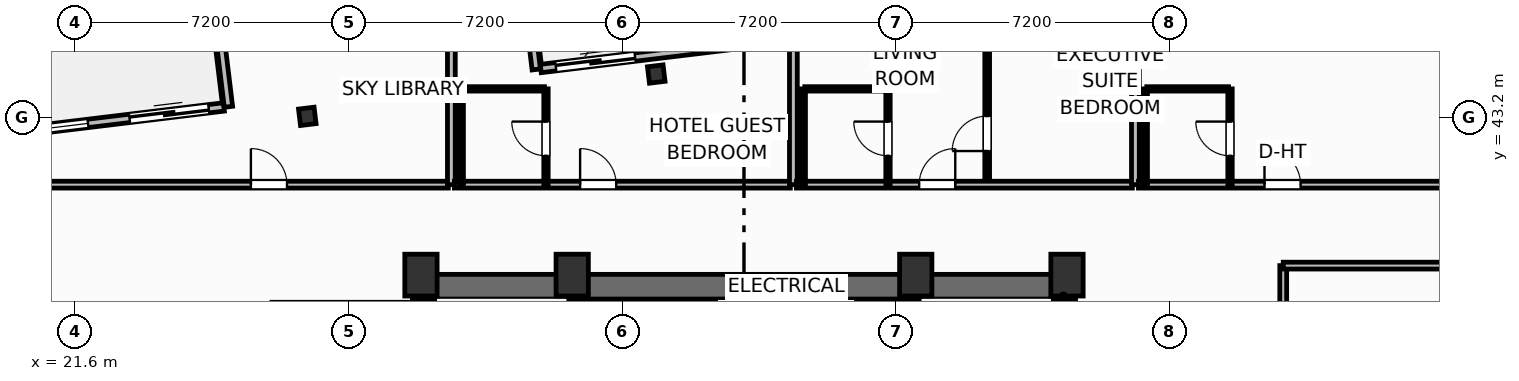
"""IFC4 building model, lengths in metres.
Left out: names, types, materials, properties, quantities, classifications, styles, units other than length and angle.
Written with IfcOpenShell. Run it as: python <this file> out.ifc"""

import sys

from ifc_helpers import new_model, si_unit, direction, frame, frame_2d, origin, origin_2d, place, context, subcontext, project, spatial, rectangle, i_section, extrude, element, fill, save


model = new_model("IFC4")
c1 = context("Model", 3, precision=1e-05, world=origin(), true_north=direction((0.0, 1.0)))
c2 = subcontext(c1, "Body", "Model", "MODEL_VIEW")
j1 = project(units=[si_unit("LENGTHUNIT", "METRE"), si_unit("PLANEANGLEUNIT", "RADIAN")], contexts=[c1])
p1 = place(None, origin())
s1 = spatial("IfcSite", under=j1, at=p1, CompositionType="ELEMENT")
p2 = place(p1, origin())
s2 = spatial("IfcBuilding", under=s1, at=p2, CompositionType="ELEMENT")
p3 = place(p2, frame((0.0, 0.0, 182.0)))
s3 = spatial("IfcBuildingStorey", under=s2, at=p3, CompositionType="ELEMENT", Elevation=182.0)
for number, where, z_axis, x_axis in (
    (1, (30.7, 39.05, 0.0), (0.0, 0.0, 1.0), (1.0, 0.0, 0.0)),
    (2, (34.68, 39.05, 0.0), (0.0, 0.0, 1.0), (1.0, 0.0, 0.0)),
    (3, (43.72, 39.05, 0.0), (0.0, 0.0, 1.0), (1.0, 0.0, 0.0)),
    (4, (47.7, 39.05, 0.0), (0.0, 0.0, 1.0), (1.0, 0.0, 0.0)),
):
    element("IfcColumn", number, at=place(p3, frame(where, z_axis=z_axis, x_axis=x_axis)), inside=s3, PredefinedType="COLUMN", context=c2, shape_type="SweptSolid", body=[
        extrude(rectangle(XDim=0.85, YDim=1.1, at=origin_2d()), origin(), (0.0, 0.0, 1.0), 3.7),
    ])
p4 = place(p3, frame((30.48, 38.745, 0.0), z_axis=(0.0, 0.0, 1.0), x_axis=(1.0, 0.0, 0.0)))
e5 = element("IfcWall", 5, at=p4, inside=s3, PredefinedType="SHEAR", context=c2, shape_type="SweptSolid", body=[
    extrude(rectangle(XDim=17.44, YDim=0.65, at=frame_2d((8.72, 0.0))), origin(), (0.0, 0.0, 1.0), 3.45),
])
for number, where, z_axis, x_axis in (
    (6, (30.805, 29.2, 0.0), (0.0, 0.0, 1.0), (0.0, 1.0, 0.0)),
    (7, (47.595, 29.2, 0.0), (0.0, 0.0, 1.0), (0.0, 1.0, 0.0)),
):
    element("IfcWall", number, at=place(p3, frame(where, z_axis=z_axis, x_axis=x_axis)), inside=s3, PredefinedType="SHEAR", context=c2, shape_type="SweptSolid", body=[
        extrude(rectangle(XDim=9.22, YDim=0.65, at=frame_2d((4.61, 0.0))), origin(), (0.0, 0.0, 1.0), 3.45),
    ])
p5 = place(p3, frame((34.64, 29.2, 0.0), z_axis=(0.0, 0.0, 1.0), x_axis=(0.0, 1.0, 0.0)))
e8 = element("IfcWall", 8, at=p5, inside=s3, PredefinedType="SHEAR", context=c2, shape_type="SweptSolid", body=[
    extrude(rectangle(XDim=9.22, YDim=0.25, at=frame_2d((4.61, 0.0))), origin(), (0.0, 0.0, 1.0), 3.45),
])
p6 = place(p5, frame((0.65, 0.0, 0.0)))
e9 = element("IfcOpeningElement", 9, at=p6, cuts=e8, PredefinedType="OPENING", context=c2, shape_type="SweptSolid", body=[
    extrude(rectangle(XDim=1.05, YDim=2.15, at=frame_2d((0.525, 1.075))), frame((0.0, 0.135, 0.0), z_axis=(0.0, -1.0, 0.0), x_axis=(1.0, 0.0, 0.0)), (0.0, 0.0, 1.0), 0.27),
])
p7 = place(p3, frame((43.76, 29.2, 0.0), z_axis=(0.0, 0.0, 1.0), x_axis=(0.0, 1.0, 0.0)))
e10 = element("IfcWall", 10, at=p7, inside=s3, PredefinedType="SHEAR", context=c2, shape_type="SweptSolid", body=[
    extrude(rectangle(XDim=9.22, YDim=0.25, at=frame_2d((4.61, 0.0))), origin(), (0.0, 0.0, 1.0), 3.45),
])
p8 = place(p7, frame((0.65, 0.0, 0.0)))
e11 = element("IfcOpeningElement", 11, at=p8, cuts=e10, PredefinedType="OPENING", context=c2, shape_type="SweptSolid", body=[
    extrude(rectangle(XDim=1.05, YDim=2.15, at=frame_2d((0.525, 1.075))), frame((0.0, 0.135, 0.0), z_axis=(0.0, -1.0, 0.0), x_axis=(1.0, 0.0, 0.0)), (0.0, 0.0, 1.0), 0.27),
])
for number, where, z_axis, x_axis in (
    (12, (36.892, 44.341, 0.0), (0.0, 0.0, 1.0), (0.993, 0.12, 0.0)),
    (13, (27.709, 43.227, 0.0), (0.0, 0.0, 1.0), (0.993, 0.12, 0.0)),
):
    element("IfcColumn", number, at=place(p3, frame(where, z_axis=z_axis, x_axis=x_axis)), inside=s3, PredefinedType="COLUMN", context=c2, shape_type="SweptSolid", body=[
        extrude(i_section(OverallWidth=0.412, OverallDepth=0.435, WebThickness=0.036, FlangeThickness=0.057, FilletRadius=0.025, at=origin_2d()), origin(), (0.0, 0.0, 1.0), 3.7),
    ])
p9 = place(p3, frame((19.557, 42.753, 0.0), z_axis=(0.0, 0.0, 1.0), x_axis=(0.992729951822, 0.120362962556, 0.0)))
e14 = element("IfcWall", 14, at=p9, inside=s3, PredefinedType="SOLIDWALL", context=c2, shape_type="SweptSolid", body=[
    extrude(rectangle(XDim=6.0, YDim=0.22, at=frame_2d((3.0, 0.0))), origin(), (0.0, 0.0, 1.0), 2.73),
])
p10 = place(p9, frame((3.5, 0.0, 0.0)))
e15 = element("IfcOpeningElement", 15, at=p10, cuts=e14, PredefinedType="OPENING", context=c2, shape_type="SweptSolid", body=[
    extrude(rectangle(XDim=2.1, YDim=2.3, at=frame_2d((1.05, 1.15))), frame((0.0, 0.12, 0.0), z_axis=(0.0, -1.0, 0.0), x_axis=(1.0, 0.0, 0.0)), (0.0, 0.0, 1.0), 0.24),
])
p11 = place(p9, frame((0.55, 0.0, 0.75)))
e16 = element("IfcOpeningElement", 16, at=p11, cuts=e14, PredefinedType="OPENING", context=c2, shape_type="SweptSolid", body=[
    extrude(rectangle(XDim=1.85, YDim=1.75, at=frame_2d((0.925, 0.875))), frame((0.0, 0.12, 0.0), z_axis=(0.0, -1.0, 0.0), x_axis=(1.0, 0.0, 0.0)), (0.0, 0.0, 1.0), 0.24),
])
p12 = place(p3, frame((33.852, 44.486, 0.0), z_axis=(0.0, 0.0, 1.0), x_axis=(0.992729951822, 0.120362962556, 0.0)))
e17 = element("IfcWall", 17, at=p12, inside=s3, PredefinedType="SOLIDWALL", context=c2, shape_type="SweptSolid", body=[
    extrude(rectangle(XDim=6.0, YDim=0.22, at=frame_2d((3.0, 0.0))), origin(), (0.0, 0.0, 1.0), 2.73),
])
p13 = place(p12, frame((0.4, 0.0, 0.0)))
e18 = element("IfcOpeningElement", 18, at=p13, cuts=e17, PredefinedType="OPENING", context=c2, shape_type="SweptSolid", body=[
    extrude(rectangle(XDim=2.1, YDim=2.3, at=frame_2d((1.05, 1.15))), frame((0.0, 0.12, 0.0), z_axis=(0.0, -1.0, 0.0), x_axis=(1.0, 0.0, 0.0)), (0.0, 0.0, 1.0), 0.24),
])
p14 = place(p3, frame((33.734, 44.461, 0.0), z_axis=(0.0, 0.0, 1.0), x_axis=(-0.120327895535, 0.992734202874, 0.0)))
e19 = element("IfcWall", 19, at=p14, inside=s3, PredefinedType="SOLIDWALL", context=c2, shape_type="SweptSolid", body=[
    extrude(rectangle(XDim=2.1, YDim=0.22, at=frame_2d((1.05, 0.0))), origin(), (0.0, 0.0, 1.0), 2.73),
])
p15 = place(p3, frame((25.396, 45.44, 0.0), z_axis=(0.0, 0.0, 1.0), x_axis=(0.120275992932, -0.992740492538, 0.0)))
e20 = element("IfcWall", 20, at=p15, inside=s3, PredefinedType="SOLIDWALL", context=c2, shape_type="SweptSolid", body=[
    extrude(rectangle(XDim=1.975, YDim=0.22, at=frame_2d((0.988, 0.0))), origin(), (0.0, 0.0, 1.0), 2.73),
])
p16 = place(p3, frame((3.393, 41.43, 0.0), z_axis=(0.0, 0.0, 1.0), x_axis=(1.0, 0.0, 0.0)))
e21 = element("IfcWall", 21, at=p16, inside=s3, PredefinedType="PARTITIONING", context=c2, shape_type="SweptSolid", body=[
    extrude(rectangle(XDim=28.027, YDim=0.18, at=frame_2d((14.013, 0.0))), origin(), (0.0, 0.0, 1.0), 2.662),
])
p17 = place(p16, frame((22.832, 0.0, 0.0)))
e22 = element("IfcOpeningElement", 22, at=p17, cuts=e21, PredefinedType="OPENING", context=c2, shape_type="SweptSolid", body=[
    extrude(rectangle(XDim=0.95, YDim=2.05, at=frame_2d((0.475, 1.025))), frame((0.0, 0.1, 0.0), z_axis=(0.0, -1.0, 0.0), x_axis=(1.0, 0.0, 0.0)), (0.0, 0.0, 1.0), 0.2),
])
p18 = place(p3, frame((31.5, 41.43, 0.0), z_axis=(0.0, 0.0, 1.0), x_axis=(0.0, 1.0, 0.0)))
e23 = element("IfcWall", 23, at=p18, inside=s3, PredefinedType="PARTITIONING", context=c2, shape_type="SweptSolid", body=[
    extrude(rectangle(XDim=4.856, YDim=0.205, at=frame_2d((2.428, 0.0))), origin(), (0.0, 0.0, 1.0), 3.45),
])
p19 = place(p3, frame((31.58, 41.43, 0.0), z_axis=(0.0, 0.0, 1.0), x_axis=(1.0, 0.0, 0.0)))
e24 = element("IfcWall", 24, at=p19, inside=s3, PredefinedType="PARTITIONING", context=c2, shape_type="SweptSolid", body=[
    extrude(rectangle(XDim=8.84, YDim=0.18, at=frame_2d((4.42, 0.0))), origin(), (0.0, 0.0, 1.0), 3.45),
])
p20 = place(p19, frame((3.308, 0.0, 0.0)))
e25 = element("IfcOpeningElement", 25, at=p20, cuts=e24, PredefinedType="OPENING", context=c2, shape_type="SweptSolid", body=[
    extrude(rectangle(XDim=0.95, YDim=2.15, at=frame_2d((0.475, 1.075))), frame((0.0, 0.1, 0.0), z_axis=(0.0, -1.0, 0.0), x_axis=(1.0, 0.0, 0.0)), (0.0, 0.0, 1.0), 0.2),
])
p21 = place(p3, frame((31.8, 43.95, 0.0), z_axis=(0.0, 0.0, 1.0), x_axis=(1.0, 0.0, 0.0)))
e26 = element("IfcWall", 26, at=p21, inside=s3, PredefinedType="PARTITIONING", context=c2, shape_type="SweptSolid", body=[
    extrude(rectangle(XDim=2.15, YDim=0.115, at=frame_2d((1.075, 0.0))), origin(), (0.0, 0.0, 1.0), 2.824),
])
p22 = place(p3, frame((33.99, 41.43, 0.0), z_axis=(0.0, 0.0, 1.0), x_axis=(0.0, 1.0, 0.0)))
e27 = element("IfcWall", 27, at=p22, inside=s3, PredefinedType="PARTITIONING", context=c2, shape_type="SweptSolid", body=[
    extrude(rectangle(XDim=2.52, YDim=0.115, at=frame_2d((1.26, 0.0))), origin(), (0.0, 0.0, 1.0), 3.45),
])
p23 = place(p22, frame((0.76, 0.0, 0.0)))
e28 = element("IfcOpeningElement", 28, at=p23, cuts=e27, PredefinedType="OPENING", context=c2, shape_type="SweptSolid", body=[
    extrude(rectangle(XDim=0.9, YDim=2.05, at=frame_2d((0.45, 1.025))), frame((0.0, 0.067, 0.0), z_axis=(0.0, -1.0, 0.0), x_axis=(1.0, 0.0, 0.0)), (0.0, 0.0, 1.0), 0.135),
])
p24 = place(p3, frame((31.76, 41.43, 0.0), z_axis=(0.0, 0.0, 1.0), x_axis=(0.0, 1.0, 0.0)))
e29 = element("IfcWall", 29, at=p24, inside=s3, PredefinedType="PARTITIONING", context=c2, shape_type="SweptSolid", body=[
    extrude(rectangle(XDim=2.52, YDim=0.115, at=frame_2d((1.26, 0.0))), origin(), (0.0, 0.0, 1.0), 3.45),
])
p25 = place(p3, frame((40.5, 41.43, 0.0), z_axis=(0.0, 0.0, 1.0), x_axis=(0.0, 1.0, 0.0)))
e30 = element("IfcWall", 30, at=p25, inside=s3, PredefinedType="PARTITIONING", context=c2, shape_type="SweptSolid", body=[
    extrude(rectangle(XDim=5.947, YDim=0.205, at=frame_2d((2.974, 0.0))), origin(), (0.0, 0.0, 1.0), 3.45),
])
p26 = place(p3, frame((45.6, 41.43, 0.0), z_axis=(0.0, 0.0, 1.0), x_axis=(0.0, 1.0, 0.0)))
e31 = element("IfcWall", 31, at=p26, inside=s3, PredefinedType="PARTITIONING", context=c2, shape_type="SweptSolid", body=[
    extrude(rectangle(XDim=6.565, YDim=0.125, at=frame_2d((3.283, 0.0))), origin(), (0.0, 0.0, 1.0), 3.45),
])
p27 = place(p26, frame((0.885, 0.0, 0.0)))
e32 = element("IfcOpeningElement", 32, at=p27, cuts=e31, PredefinedType="OPENING", context=c2, shape_type="SweptSolid", body=[
    extrude(rectangle(XDim=0.92, YDim=2.05, at=frame_2d((0.46, 1.025))), frame((0.0, 0.073, 0.0), z_axis=(0.0, -1.0, 0.0), x_axis=(1.0, 0.0, 0.0)), (0.0, 0.0, 1.0), 0.145),
])
p28 = place(p3, frame((40.58, 41.43, 0.0), z_axis=(0.0, 0.0, 1.0), x_axis=(1.0, 0.0, 0.0)))
e33 = element("IfcWall", 33, at=p28, inside=s3, PredefinedType="PARTITIONING", context=c2, shape_type="SweptSolid", body=[
    extrude(rectangle(XDim=8.84, YDim=0.18, at=frame_2d((4.42, 0.0))), origin(), (0.0, 0.0, 1.0), 3.45),
])
p29 = place(p28, frame((3.23, 0.0, 0.0)))
e34 = element("IfcOpeningElement", 34, at=p29, cuts=e33, PredefinedType="OPENING", context=c2, shape_type="SweptSolid", body=[
    extrude(rectangle(XDim=0.95, YDim=2.15, at=frame_2d((0.475, 1.075))), frame((0.0, 0.1, 0.0), z_axis=(0.0, -1.0, 0.0), x_axis=(1.0, 0.0, 0.0)), (0.0, 0.0, 1.0), 0.2),
])
p30 = place(p3, frame((40.8, 43.95, 0.0), z_axis=(0.0, 0.0, 1.0), x_axis=(1.0, 0.0, 0.0)))
e35 = element("IfcWall", 35, at=p30, inside=s3, PredefinedType="PARTITIONING", context=c2, shape_type="SweptSolid", body=[
    extrude(rectangle(XDim=2.15, YDim=0.115, at=frame_2d((1.075, 0.0))), origin(), (0.0, 0.0, 1.0), 3.45),
])
p31 = place(p3, frame((42.99, 41.43, 0.0), z_axis=(0.0, 0.0, 1.0), x_axis=(0.0, 1.0, 0.0)))
e36 = element("IfcWall", 36, at=p31, inside=s3, PredefinedType="PARTITIONING", context=c2, shape_type="SweptSolid", body=[
    extrude(rectangle(XDim=2.52, YDim=0.115, at=frame_2d((1.26, 0.0))), origin(), (0.0, 0.0, 1.0), 3.45),
])
p32 = place(p31, frame((0.76, 0.0, 0.0)))
e37 = element("IfcOpeningElement", 37, at=p32, cuts=e36, PredefinedType="OPENING", context=c2, shape_type="SweptSolid", body=[
    extrude(rectangle(XDim=0.9, YDim=2.05, at=frame_2d((0.45, 1.025))), frame((0.0, 0.067, 0.0), z_axis=(0.0, -1.0, 0.0), x_axis=(1.0, 0.0, 0.0)), (0.0, 0.0, 1.0), 0.135),
])
p33 = place(p3, frame((40.76, 41.43, 0.0), z_axis=(0.0, 0.0, 1.0), x_axis=(0.0, 1.0, 0.0)))
e38 = element("IfcWall", 38, at=p33, inside=s3, PredefinedType="PARTITIONING", context=c2, shape_type="SweptSolid", body=[
    extrude(rectangle(XDim=2.52, YDim=0.115, at=frame_2d((1.26, 0.0))), origin(), (0.0, 0.0, 1.0), 3.45),
])
p34 = place(p3, frame((49.5, 41.43, 0.0), z_axis=(0.0, 0.0, 1.0), x_axis=(0.0, 1.0, 0.0)))
e39 = element("IfcWall", 39, at=p34, inside=s3, PredefinedType="PARTITIONING", context=c2, shape_type="SweptSolid", body=[
    extrude(rectangle(XDim=4.923, YDim=0.205, at=frame_2d((2.461, 0.0))), origin(), (0.0, 0.0, 1.0), 3.45),
])
p35 = place(p3, frame((49.58, 41.43, 0.0), z_axis=(0.0, 0.0, 1.0), x_axis=(1.0, 0.0, 0.0)))
e40 = element("IfcWall", 40, at=p35, inside=s3, PredefinedType="PARTITIONING", context=c2, shape_type="SweptSolid", body=[
    extrude(rectangle(XDim=23.042, YDim=0.18, at=frame_2d((11.521, 0.0))), origin(), (0.0, 0.0, 1.0), 3.45),
])
p36 = place(p35, frame((3.317, 0.0, 0.0)))
e41 = element("IfcOpeningElement", 41, at=p36, cuts=e40, PredefinedType="OPENING", context=c2, shape_type="SweptSolid", body=[
    extrude(rectangle(XDim=0.95, YDim=2.15, at=frame_2d((0.475, 1.075))), frame((0.0, 0.1, 0.0), z_axis=(0.0, -1.0, 0.0), x_axis=(1.0, 0.0, 0.0)), (0.0, 0.0, 1.0), 0.2),
])
p37 = place(p3, frame((49.8, 43.95, 0.0), z_axis=(0.0, 0.0, 1.0), x_axis=(1.0, 0.0, 0.0)))
e42 = element("IfcWall", 42, at=p37, inside=s3, PredefinedType="PARTITIONING", context=c2, shape_type="SweptSolid", body=[
    extrude(rectangle(XDim=2.15, YDim=0.115, at=frame_2d((1.075, 0.0))), origin(), (0.0, 0.0, 1.0), 3.45),
])
p38 = place(p3, frame((51.99, 41.43, 0.0), z_axis=(0.0, 0.0, 1.0), x_axis=(0.0, 1.0, 0.0)))
e43 = element("IfcWall", 43, at=p38, inside=s3, PredefinedType="PARTITIONING", context=c2, shape_type="SweptSolid", body=[
    extrude(rectangle(XDim=2.52, YDim=0.115, at=frame_2d((1.26, 0.0))), origin(), (0.0, 0.0, 1.0), 3.45),
])
p39 = place(p38, frame((0.76, 0.0, 0.0)))
e44 = element("IfcOpeningElement", 44, at=p39, cuts=e43, PredefinedType="OPENING", context=c2, shape_type="SweptSolid", body=[
    extrude(rectangle(XDim=0.9, YDim=2.05, at=frame_2d((0.45, 1.025))), frame((0.0, 0.067, 0.0), z_axis=(0.0, -1.0, 0.0), x_axis=(1.0, 0.0, 0.0)), (0.0, 0.0, 1.0), 0.135),
])
p40 = place(p3, frame((49.76, 41.43, 0.0), z_axis=(0.0, 0.0, 1.0), x_axis=(0.0, 1.0, 0.0)))
e45 = element("IfcWall", 45, at=p40, inside=s3, PredefinedType="PARTITIONING", context=c2, shape_type="SweptSolid", body=[
    extrude(rectangle(XDim=2.52, YDim=0.115, at=frame_2d((1.26, 0.0))), origin(), (0.0, 0.0, 1.0), 3.45),
])
p41 = place(p3, frame((53.39, 19.28, 0.0), z_axis=(0.0, 0.0, 1.0), x_axis=(0.0, 1.0, 0.0)))
e46 = element("IfcWall", 46, at=p41, inside=s3, PredefinedType="PARTITIONING", context=c2, shape_type="SweptSolid", body=[
    extrude(rectangle(XDim=20.02, YDim=0.18, at=frame_2d((10.01, 0.0))), origin(), (0.0, 0.0, 1.0), 3.45),
])
p42 = place(p41, frame((8.07, 0.0, 0.0)))
e47 = element("IfcOpeningElement", 47, at=p42, cuts=e46, PredefinedType="OPENING", context=c2, shape_type="SweptSolid", body=[
    extrude(rectangle(XDim=0.92, YDim=2.05, at=frame_2d((0.46, 1.025))), frame((0.0, 0.1, 0.0), z_axis=(0.0, -1.0, 0.0), x_axis=(1.0, 0.0, 0.0)), (0.0, 0.0, 1.0), 0.2),
])
p43 = place(p3, frame((53.39, 39.3, 0.0), z_axis=(0.0, 0.0, 1.0), x_axis=(1.0, 0.0, 0.0)))
e48 = element("IfcWall", 48, at=p43, inside=s3, PredefinedType="PARTITIONING", context=c2, shape_type="SweptSolid", body=[
    extrude(rectangle(XDim=19.49, YDim=0.18, at=frame_2d((9.745, 0.0))), origin(), (0.0, 0.0, 1.0), 3.45),
])
p44 = place(p10, origin())
e49 = element("IfcDoor", 49, at=p44, inside=s3, OperationType="SLIDING_TO_LEFT", PredefinedType="DOOR", context=c2, shape_type="SweptSolid", body=[
    extrude(rectangle(XDim=2.1, YDim=2.3, at=frame_2d((1.05, 1.15))), frame((0.0, 0.025, 0.0), z_axis=(0.0, -1.0, 0.0), x_axis=(1.0, 0.0, 0.0)), (0.0, 0.0, 1.0), 0.05),
])
fill(e15, e49)
p45 = place(p11, origin())
e50 = element("IfcWindow", 50, at=p45, inside=s3, PartitioningType="SINGLE_PANEL", PredefinedType="WINDOW", context=c2, shape_type="SweptSolid", body=[
    extrude(rectangle(XDim=1.85, YDim=1.75, at=frame_2d((0.925, 0.875))), frame((0.0, 0.03, 0.0), z_axis=(0.0, -1.0, 0.0), x_axis=(1.0, 0.0, 0.0)), (0.0, 0.0, 1.0), 0.06),
])
fill(e16, e50)
p46 = place(p13, origin())
e51 = element("IfcDoor", 51, at=p46, inside=s3, OperationType="SLIDING_TO_LEFT", PredefinedType="DOOR", context=c2, shape_type="SweptSolid", body=[
    extrude(rectangle(XDim=2.1, YDim=2.3, at=frame_2d((1.05, 1.15))), frame((0.0, 0.025, 0.0), z_axis=(0.0, -1.0, 0.0), x_axis=(1.0, 0.0, 0.0)), (0.0, 0.0, 1.0), 0.05),
])
fill(e18, e51)
p47 = place(p17, origin())
e52 = element("IfcDoor", 52, at=p47, inside=s3, OperationType="SINGLE_SWING_LEFT", PredefinedType="DOOR", context=c2, shape_type="SweptSolid", body=[
    extrude(rectangle(XDim=0.95, YDim=2.05, at=frame_2d((0.475, 1.025))), frame((0.0, 0.025, 0.0), z_axis=(0.0, -1.0, 0.0), x_axis=(1.0, 0.0, 0.0)), (0.0, 0.0, 1.0), 0.05),
])
fill(e22, e52)
p48 = place(p20, origin())
e53 = element("IfcDoor", 53, at=p48, inside=s3, OperationType="SINGLE_SWING_LEFT", PredefinedType="DOOR", context=c2, shape_type="SweptSolid", body=[
    extrude(rectangle(XDim=0.95, YDim=2.15, at=frame_2d((0.475, 1.075))), frame((0.0, 0.025, 0.0), z_axis=(0.0, -1.0, 0.0), x_axis=(1.0, 0.0, 0.0)), (0.0, 0.0, 1.0), 0.05),
])
fill(e25, e53)
p49 = place(p23, origin())
e54 = element("IfcDoor", 54, at=p49, inside=s3, OperationType="SINGLE_SWING_RIGHT", PredefinedType="DOOR", context=c2, shape_type="SweptSolid", body=[
    extrude(rectangle(XDim=0.9, YDim=2.05, at=frame_2d((0.45, 1.025))), frame((0.0, 0.025, 0.0), z_axis=(0.0, -1.0, 0.0), x_axis=(1.0, 0.0, 0.0)), (0.0, 0.0, 1.0), 0.05),
])
fill(e28, e54)
p50 = place(p27, origin())
e55 = element("IfcDoor", 55, at=p50, inside=s3, OperationType="SINGLE_SWING_LEFT", PredefinedType="DOOR", context=c2, shape_type="SweptSolid", body=[
    extrude(rectangle(XDim=0.92, YDim=2.05, at=frame_2d((0.46, 1.025))), frame((0.0, 0.025, 0.0), z_axis=(0.0, -1.0, 0.0), x_axis=(1.0, 0.0, 0.0)), (0.0, 0.0, 1.0), 0.05),
])
fill(e32, e55)
p51 = place(p29, origin())
e56 = element("IfcDoor", 56, at=p51, inside=s3, OperationType="SINGLE_SWING_RIGHT", PredefinedType="DOOR", context=c2, shape_type="SweptSolid", body=[
    extrude(rectangle(XDim=0.95, YDim=2.15, at=frame_2d((0.475, 1.075))), frame((0.0, 0.025, 0.0), z_axis=(0.0, -1.0, 0.0), x_axis=(1.0, 0.0, 0.0)), (0.0, 0.0, 1.0), 0.05),
])
fill(e34, e56)
p52 = place(p32, origin())
e57 = element("IfcDoor", 57, at=p52, inside=s3, OperationType="SINGLE_SWING_RIGHT", PredefinedType="DOOR", context=c2, shape_type="SweptSolid", body=[
    extrude(rectangle(XDim=0.9, YDim=2.05, at=frame_2d((0.45, 1.025))), frame((0.0, 0.025, 0.0), z_axis=(0.0, -1.0, 0.0), x_axis=(1.0, 0.0, 0.0)), (0.0, 0.0, 1.0), 0.05),
])
fill(e37, e57)
p53 = place(p36, origin())
e58 = element("IfcDoor", 58, at=p53, inside=s3, OperationType="SINGLE_SWING_LEFT", PredefinedType="DOOR", context=c2, shape_type="SweptSolid", body=[
    extrude(rectangle(XDim=0.95, YDim=2.15, at=frame_2d((0.475, 1.075))), frame((0.0, 0.025, 0.0), z_axis=(0.0, -1.0, 0.0), x_axis=(1.0, 0.0, 0.0)), (0.0, 0.0, 1.0), 0.05),
])
fill(e41, e58)
p54 = place(p39, origin())
e59 = element("IfcDoor", 59, at=p54, inside=s3, OperationType="SINGLE_SWING_RIGHT", PredefinedType="DOOR", context=c2, shape_type="SweptSolid", body=[
    extrude(rectangle(XDim=0.9, YDim=2.05, at=frame_2d((0.45, 1.025))), frame((0.0, 0.025, 0.0), z_axis=(0.0, -1.0, 0.0), x_axis=(1.0, 0.0, 0.0)), (0.0, 0.0, 1.0), 0.05),
])
fill(e44, e59)
save(model, sys.argv[1])
